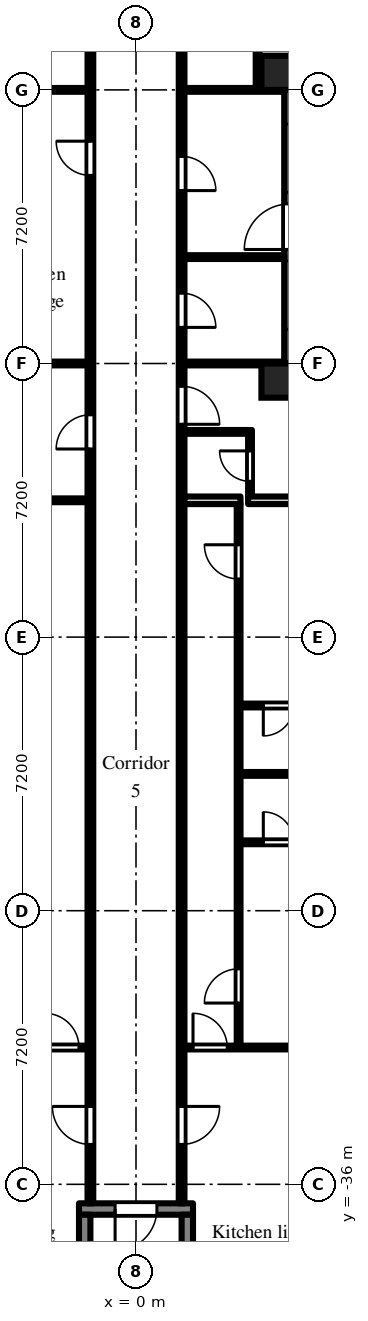
"""IFC4 building model, lengths in metres.
Left out: names, types, materials, properties, quantities, classifications, styles, units other than length and angle.
Written with IfcOpenShell. Run it as: python <this file> out.ifc"""

import sys

from ifc_helpers import new_model, si_unit, direction, frame, frame_2d, origin, origin_2d, place, context, subcontext, project, spatial, rectangle, extrude, element, fill, save


model = new_model("IFC4")
c1 = context("Model", 3, precision=1e-05, world=origin(), true_north=direction((0.0, 1.0)))
c2 = subcontext(c1, "Body", "Model", "MODEL_VIEW")
j1 = project(units=[si_unit("LENGTHUNIT", "METRE"), si_unit("PLANEANGLEUNIT", "RADIAN")], contexts=[c1])
p1 = place(None, origin())
s1 = spatial("IfcSite", under=j1, at=p1, CompositionType="ELEMENT")
p2 = place(p1, origin())
s2 = spatial("IfcBuilding", under=s1, at=p2, CompositionType="ELEMENT")
p3 = place(p2, frame((0.0, 0.0, 84.9)))
s3 = spatial("IfcBuildingStorey", under=s2, at=p3, CompositionType="ELEMENT", Elevation=84.9)
for number, where, z_axis, x_axis in (
    (1, (3.75, -14.85, 0.0), (0.0, 0.0, 1.0), (1.0, 0.0, 0.0)),
    (2, (3.75, -6.75, 0.0), (0.0, 0.0, 1.0), (1.0, 0.0, 0.0)),
):
    element("IfcColumn", number, at=place(p3, frame(where, z_axis=z_axis, x_axis=x_axis)), inside=s3, PredefinedType="COLUMN", context=c2, shape_type="SweptSolid", body=[
        extrude(rectangle(XDim=0.9, YDim=0.9, at=origin_2d()), origin(), (0.0, 0.0, 1.0), 3.0),
    ])
p4 = place(p3, frame((4.05, -14.4, 0.0), z_axis=(0.0, 0.0, 1.0), x_axis=(0.0, 1.0, 0.0)))
e3 = element("IfcWall", 3, at=p4, inside=s3, PredefinedType="SOLIDWALL", context=c2, shape_type="SweptSolid", body=[
    extrude(rectangle(XDim=7.2, YDim=0.3, at=frame_2d((3.6, 0.0))), origin(), (0.0, 0.0, 1.0), 2.1),
])
p5 = place(p4, frame((3.0, 0.0, 0.0)))
e4 = element("IfcOpeningElement", 4, at=p5, cuts=e3, PredefinedType="OPENING", context=c2, shape_type="SweptSolid", body=[
    extrude(rectangle(XDim=1.2, YDim=2.05, at=frame_2d((0.6, 1.025))), frame((0.0, 0.16, 0.0), z_axis=(0.0, -1.0, 0.0), x_axis=(1.0, 0.0, 0.0)), (0.0, 0.0, 1.0), 0.32),
])
p6 = place(p4, frame((0.9, 0.0, 0.2)))
e5 = element("IfcOpeningElement", 5, at=p6, cuts=e3, PredefinedType="OPENING", context=c2, shape_type="SweptSolid", body=[
    extrude(rectangle(XDim=1.8, YDim=1.85, at=frame_2d((0.9, 0.925))), frame((0.0, 0.16, 0.0), z_axis=(0.0, -1.0, 0.0), x_axis=(1.0, 0.0, 0.0)), (0.0, 0.0, 1.0), 0.32),
])
p7 = place(p4, frame((4.5, 0.0, 0.2)))
e6 = element("IfcOpeningElement", 6, at=p7, cuts=e3, PredefinedType="OPENING", context=c2, shape_type="SweptSolid", body=[
    extrude(rectangle(XDim=1.8, YDim=1.85, at=frame_2d((0.9, 0.925))), frame((0.0, 0.16, 0.0), z_axis=(0.0, -1.0, 0.0), x_axis=(1.0, 0.0, 0.0)), (0.0, 0.0, 1.0), 0.32),
])
p8 = place(p3, frame((-1.5, -36.65, 0.0), z_axis=(0.0, 0.0, 1.0), x_axis=(1.0, 0.0, 0.0)))
e7 = element("IfcWall", 7, at=p8, inside=s3, PredefinedType="SHEAR", context=c2, shape_type="SweptSolid", body=[
    extrude(rectangle(XDim=3.0, YDim=0.3, at=frame_2d((1.5, 0.0))), origin(), (0.0, 0.0, 1.0), 2.575),
])
p9 = place(p8, frame((0.95, 0.0, 0.0)))
e8 = element("IfcOpeningElement", 8, at=p9, cuts=e7, PredefinedType="OPENING", context=c2, shape_type="SweptSolid", body=[
    extrude(rectangle(XDim=1.1, YDim=2.1, at=frame_2d((0.55, 1.05))), frame((0.0, 0.16, 0.0), z_axis=(0.0, -1.0, 0.0), x_axis=(1.0, 0.0, 0.0)), (0.0, 0.0, 1.0), 0.32),
])
for number, where, z_axis, x_axis in (
    (9, (-1.35, -36.8, 0.0), (0.0, 0.0, 1.0), (0.0, -1.0, 0.0)),
    (10, (1.35, -36.8, 0.0), (0.0, 0.0, 1.0), (0.0, -1.0, 0.0)),
):
    element("IfcWall", number, at=place(p3, frame(where, z_axis=z_axis, x_axis=x_axis)), inside=s3, PredefinedType="SHEAR", context=c2, shape_type="SweptSolid", body=[
        extrude(rectangle(XDim=5.8, YDim=0.3, at=frame_2d((2.9, 0.0))), origin(), (0.0, 0.0, 1.0), 2.575),
    ])
p10 = place(p3, frame((-6.9, -32.4, 0.0), z_axis=(0.0, 0.0, 1.0), x_axis=(1.0, 0.0, 0.0)))
e11 = element("IfcWall", 11, at=p10, inside=s3, PredefinedType="PARTITIONING", context=c2, shape_type="SweptSolid", body=[
    extrude(rectangle(XDim=5.625, YDim=0.1, at=frame_2d((2.812, 0.0))), origin(), (0.0, 0.0, 1.0), 2.575),
])
p11 = place(p10, frame((4.5, 0.0, 0.0)))
e12 = element("IfcOpeningElement", 12, at=p11, cuts=e11, PredefinedType="OPENING", context=c2, shape_type="SweptSolid", body=[
    extrude(rectangle(XDim=0.9, YDim=2.1, at=frame_2d((0.45, 1.05))), frame((0.0, 0.06, 0.0), z_axis=(0.0, -1.0, 0.0), x_axis=(1.0, 0.0, 0.0)), (0.0, 0.0, 1.0), 0.12),
])
p12 = place(p3, frame((-6.9, -18.0, 0.0), z_axis=(0.0, 0.0, 1.0), x_axis=(1.0, 0.0, 0.0)))
e13 = element("IfcWall", 13, at=p12, inside=s3, PredefinedType="PARTITIONING", context=c2, shape_type="SweptSolid", body=[
    extrude(rectangle(XDim=5.625, YDim=0.1, at=frame_2d((2.812, 0.0))), origin(), (0.0, 0.0, 1.0), 2.575),
])
for number, where, z_axis, x_axis in (
    (14, (-3.9, -14.4, 0.0), (0.0, 0.0, 1.0), (1.0, 0.0, 0.0)),
    (15, (-3.9, -7.2, 0.0), (0.0, 0.0, 1.0), (1.0, 0.0, 0.0)),
):
    element("IfcWall", number, at=place(p3, frame(where, z_axis=z_axis, x_axis=x_axis)), inside=s3, PredefinedType="PARTITIONING", context=c2, shape_type="SweptSolid", body=[
        extrude(rectangle(XDim=2.625, YDim=0.1, at=frame_2d((1.312, 0.0))), origin(), (0.0, 0.0, 1.0), 2.575),
    ])
p13 = place(p3, frame((-1.2, -36.5, 0.0), z_axis=(0.0, 0.0, 1.0), x_axis=(0.0, 1.0, 0.0)))
e16 = element("IfcWall", 16, at=p13, inside=s3, PredefinedType="PARTITIONING", context=c2, shape_type="SweptSolid", body=[
    extrude(rectangle(XDim=35.225, YDim=0.15, at=frame_2d((17.613, 0.0))), origin(), (0.0, 0.0, 1.0), 2.575),
])
p14 = place(p13, frame((30.75, 0.0, 0.0)))
e17 = element("IfcOpeningElement", 17, at=p14, cuts=e16, PredefinedType="OPENING", context=c2, shape_type="SweptSolid", body=[
    extrude(rectangle(XDim=0.9, YDim=2.1, at=frame_2d((0.45, 1.05))), frame((0.0, 0.085, 0.0), z_axis=(0.0, -1.0, 0.0), x_axis=(1.0, 0.0, 0.0)), (0.0, 0.0, 1.0), 0.17),
])
p15 = place(p13, frame((27.05, 0.0, 0.0)))
e18 = element("IfcOpeningElement", 18, at=p15, cuts=e16, PredefinedType="OPENING", context=c2, shape_type="SweptSolid", body=[
    extrude(rectangle(XDim=0.9, YDim=2.1, at=frame_2d((0.45, 1.05))), frame((0.0, 0.085, 0.0), z_axis=(0.0, -1.0, 0.0), x_axis=(1.0, 0.0, 0.0)), (0.0, 0.0, 1.0), 0.17),
])
p16 = place(p13, frame((19.85, 0.0, 0.0)))
e19 = element("IfcOpeningElement", 19, at=p16, cuts=e16, PredefinedType="OPENING", context=c2, shape_type="SweptSolid", body=[
    extrude(rectangle(XDim=0.9, YDim=2.1, at=frame_2d((0.45, 1.05))), frame((0.0, 0.085, 0.0), z_axis=(0.0, -1.0, 0.0), x_axis=(1.0, 0.0, 0.0)), (0.0, 0.0, 1.0), 0.17),
])
p17 = place(p13, frame((1.55, 0.0, 0.0)))
e20 = element("IfcOpeningElement", 20, at=p17, cuts=e16, PredefinedType="OPENING", context=c2, shape_type="SweptSolid", body=[
    extrude(rectangle(XDim=1.0, YDim=2.1, at=frame_2d((0.5, 1.05))), frame((0.0, 0.085, 0.0), z_axis=(0.0, -1.0, 0.0), x_axis=(1.0, 0.0, 0.0)), (0.0, 0.0, 1.0), 0.17),
])
p18 = place(p3, frame((1.2, -36.5, 0.0), z_axis=(0.0, 0.0, 1.0), x_axis=(0.0, 1.0, 0.0)))
e21 = element("IfcWall", 21, at=p18, inside=s3, PredefinedType="PARTITIONING", context=c2, shape_type="SweptSolid", body=[
    extrude(rectangle(XDim=35.375, YDim=0.15, at=frame_2d((17.688, 0.0))), origin(), (0.0, 0.0, 1.0), 2.575),
])
p19 = place(p18, frame((31.85, 0.0, 0.0)))
e22 = element("IfcOpeningElement", 22, at=p19, cuts=e21, PredefinedType="OPENING", context=c2, shape_type="SweptSolid", body=[
    extrude(rectangle(XDim=0.9, YDim=2.1, at=frame_2d((0.45, 1.05))), frame((0.0, 0.085, 0.0), z_axis=(0.0, -1.0, 0.0), x_axis=(1.0, 0.0, 0.0)), (0.0, 0.0, 1.0), 0.17),
])
p20 = place(p18, frame((23.05, 0.0, 0.0)))
e23 = element("IfcOpeningElement", 23, at=p20, cuts=e21, PredefinedType="OPENING", context=c2, shape_type="SweptSolid", body=[
    extrude(rectangle(XDim=0.9, YDim=2.1, at=frame_2d((0.45, 1.05))), frame((0.0, 0.085, 0.0), z_axis=(0.0, -1.0, 0.0), x_axis=(1.0, 0.0, 0.0)), (0.0, 0.0, 1.0), 0.17),
])
p21 = place(p18, frame((26.65, 0.0, 0.0)))
e24 = element("IfcOpeningElement", 24, at=p21, cuts=e21, PredefinedType="OPENING", context=c2, shape_type="SweptSolid", body=[
    extrude(rectangle(XDim=0.9, YDim=2.1, at=frame_2d((0.45, 1.05))), frame((0.0, 0.085, 0.0), z_axis=(0.0, -1.0, 0.0), x_axis=(1.0, 0.0, 0.0)), (0.0, 0.0, 1.0), 0.17),
])
p22 = place(p18, frame((20.5, 0.0, 0.0)))
e25 = element("IfcOpeningElement", 25, at=p22, cuts=e21, PredefinedType="OPENING", context=c2, shape_type="SweptSolid", body=[
    extrude(rectangle(XDim=1.0, YDim=2.1, at=frame_2d((0.5, 1.05))), frame((0.0, 0.085, 0.0), z_axis=(0.0, -1.0, 0.0), x_axis=(1.0, 0.0, 0.0)), (0.0, 0.0, 1.0), 0.17),
])
p23 = place(p18, frame((1.55, 0.0, 0.0)))
e26 = element("IfcOpeningElement", 26, at=p23, cuts=e21, PredefinedType="OPENING", context=c2, shape_type="SweptSolid", body=[
    extrude(rectangle(XDim=1.0, YDim=2.1, at=frame_2d((0.5, 1.05))), frame((0.0, 0.085, 0.0), z_axis=(0.0, -1.0, 0.0), x_axis=(1.0, 0.0, 0.0)), (0.0, 0.0, 1.0), 0.17),
])
p24 = place(p3, frame((1.275, -32.4, 0.0), z_axis=(0.0, 0.0, 1.0), x_axis=(1.0, 0.0, 0.0)))
e27 = element("IfcWall", 27, at=p24, inside=s3, PredefinedType="PARTITIONING", context=c2, shape_type="SweptSolid", body=[
    extrude(rectangle(XDim=5.625, YDim=0.1, at=frame_2d((2.812, 0.0))), origin(), (0.0, 0.0, 1.0), 2.575),
])
p25 = place(p24, frame((0.225, 0.0, 0.0)))
e28 = element("IfcOpeningElement", 28, at=p25, cuts=e27, PredefinedType="OPENING", context=c2, shape_type="SweptSolid", body=[
    extrude(rectangle(XDim=0.9, YDim=2.1, at=frame_2d((0.45, 1.05))), frame((0.0, 0.06, 0.0), z_axis=(0.0, -1.0, 0.0), x_axis=(1.0, 0.0, 0.0)), (0.0, 0.0, 1.0), 0.12),
])
p26 = place(p3, frame((1.275, -18.0, 0.0), z_axis=(0.0, 0.0, 1.0), x_axis=(1.0, 0.0, 0.0)))
e29 = element("IfcWall", 29, at=p26, inside=s3, PredefinedType="PARTITIONING", context=c2, shape_type="SweptSolid", body=[
    extrude(rectangle(XDim=1.475, YDim=0.2, at=frame_2d((0.738, 0.0))), origin(), (0.0, 0.0, 1.0), 2.575),
])
p27 = place(p3, frame((1.275, -16.2, 0.0), z_axis=(0.0, 0.0, 1.0), x_axis=(1.0, 0.0, 0.0)))
e30 = element("IfcWall", 30, at=p27, inside=s3, PredefinedType="PARTITIONING", context=c2, shape_type="SweptSolid", body=[
    extrude(rectangle(XDim=1.775, YDim=0.1, at=frame_2d((0.888, 0.0))), origin(), (0.0, 0.0, 1.0), 2.575),
])
for number, where, z_axis, x_axis in (
    (31, (1.275, -14.4, 0.0), (0.0, 0.0, 1.0), (1.0, 0.0, 0.0)),
    (32, (1.275, -11.6, 0.0), (0.0, 0.0, 1.0), (1.0, 0.0, 0.0)),
    (33, (1.275, -7.2, 0.0), (0.0, 0.0, 1.0), (1.0, 0.0, 0.0)),
):
    element("IfcWall", number, at=place(p3, frame(where, z_axis=z_axis, x_axis=x_axis)), inside=s3, PredefinedType="PARTITIONING", context=c2, shape_type="SweptSolid", body=[
        extrude(rectangle(XDim=2.625, YDim=0.1, at=frame_2d((1.312, 0.0))), origin(), (0.0, 0.0, 1.0), 2.575),
    ])
p28 = place(p3, frame((2.7, -32.35, 0.0), z_axis=(0.0, 0.0, 1.0), x_axis=(0.0, 1.0, 0.0)))
e34 = element("IfcWall", 34, at=p28, inside=s3, PredefinedType="PARTITIONING", context=c2, shape_type="SweptSolid", body=[
    extrude(rectangle(XDim=14.25, YDim=0.1, at=frame_2d((7.125, 0.0))), origin(), (0.0, 0.0, 1.0), 2.575),
])
p29 = place(p28, frame((1.12, 0.0, 0.0)))
e35 = element("IfcOpeningElement", 35, at=p29, cuts=e34, PredefinedType="OPENING", context=c2, shape_type="SweptSolid", body=[
    extrude(rectangle(XDim=0.9, YDim=2.1, at=frame_2d((0.45, 1.05))), frame((0.0, 0.06, 0.0), z_axis=(0.0, -1.0, 0.0), x_axis=(1.0, 0.0, 0.0)), (0.0, 0.0, 1.0), 0.12),
])
p30 = place(p28, frame((12.28, 0.0, 0.0)))
e36 = element("IfcOpeningElement", 36, at=p30, cuts=e34, PredefinedType="OPENING", context=c2, shape_type="SweptSolid", body=[
    extrude(rectangle(XDim=0.9, YDim=2.1, at=frame_2d((0.45, 1.05))), frame((0.0, 0.06, 0.0), z_axis=(0.0, -1.0, 0.0), x_axis=(1.0, 0.0, 0.0)), (0.0, 0.0, 1.0), 0.12),
])
p31 = place(p3, frame((2.75, -27.0, 0.0), z_axis=(0.0, 0.0, 1.0), x_axis=(1.0, 0.0, 0.0)))
e37 = element("IfcWall", 37, at=p31, inside=s3, PredefinedType="PARTITIONING", context=c2, shape_type="SweptSolid", body=[
    extrude(rectangle(XDim=2.1, YDim=0.1, at=frame_2d((1.05, 0.0))), origin(), (0.0, 0.0, 1.0), 2.575),
])
p32 = place(p31, frame((0.6, 0.0, 0.0)))
e38 = element("IfcOpeningElement", 38, at=p32, cuts=e37, PredefinedType="OPENING", context=c2, shape_type="SweptSolid", body=[
    extrude(rectangle(XDim=0.8, YDim=2.1, at=frame_2d((0.4, 1.05))), frame((0.0, 0.06, 0.0), z_axis=(0.0, -1.0, 0.0), x_axis=(1.0, 0.0, 0.0)), (0.0, 0.0, 1.0), 0.12),
])
p33 = place(p3, frame((2.75, -25.2, 0.0), z_axis=(0.0, 0.0, 1.0), x_axis=(1.0, 0.0, 0.0)))
e39 = element("IfcWall", 39, at=p33, inside=s3, PredefinedType="PARTITIONING", context=c2, shape_type="SweptSolid", body=[
    extrude(rectangle(XDim=4.15, YDim=0.1, at=frame_2d((2.075, 0.0))), origin(), (0.0, 0.0, 1.0), 2.575),
])
p34 = place(p3, frame((2.75, -23.4, 0.0), z_axis=(0.0, 0.0, 1.0), x_axis=(1.0, 0.0, 0.0)))
e40 = element("IfcWall", 40, at=p34, inside=s3, PredefinedType="PARTITIONING", context=c2, shape_type="SweptSolid", body=[
    extrude(rectangle(XDim=2.1, YDim=0.1, at=frame_2d((1.05, 0.0))), origin(), (0.0, 0.0, 1.0), 2.575),
])
p35 = place(p34, frame((0.6, 0.0, 0.0)))
e41 = element("IfcOpeningElement", 41, at=p35, cuts=e40, PredefinedType="OPENING", context=c2, shape_type="SweptSolid", body=[
    extrude(rectangle(XDim=0.8, YDim=2.1, at=frame_2d((0.4, 1.05))), frame((0.0, 0.06, 0.0), z_axis=(0.0, -1.0, 0.0), x_axis=(1.0, 0.0, 0.0)), (0.0, 0.0, 1.0), 0.12),
])
p36 = place(p3, frame((3.0, -17.9, 0.0), z_axis=(0.0, 0.0, 1.0), x_axis=(0.0, 1.0, 0.0)))
e42 = element("IfcWall", 42, at=p36, inside=s3, PredefinedType="PARTITIONING", context=c2, shape_type="SweptSolid", body=[
    extrude(rectangle(XDim=1.65, YDim=0.1, at=frame_2d((0.825, 0.0))), origin(), (0.0, 0.0, 1.0), 2.575),
])
p37 = place(p36, frame((0.4, 0.0, 0.0)))
e43 = element("IfcOpeningElement", 43, at=p37, cuts=e42, PredefinedType="OPENING", context=c2, shape_type="SweptSolid", body=[
    extrude(rectangle(XDim=0.8, YDim=2.1, at=frame_2d((0.4, 1.05))), frame((0.0, 0.06, 0.0), z_axis=(0.0, -1.0, 0.0), x_axis=(1.0, 0.0, 0.0)), (0.0, 0.0, 1.0), 0.12),
])
p38 = place(p3, frame((2.95, -18.0, 0.0), z_axis=(0.0, 0.0, 1.0), x_axis=(1.0, 0.0, 0.0)))
e44 = element("IfcWall", 44, at=p38, inside=s3, PredefinedType="PARTITIONING", context=c2, shape_type="SweptSolid", body=[
    extrude(rectangle(XDim=3.95, YDim=0.2, at=frame_2d((1.975, 0.0))), origin(), (0.0, 0.0, 1.0), 2.575),
])
p39 = place(p3, frame((3.2, -7.15, 0.0), z_axis=(0.0, 0.0, 1.0), x_axis=(0.0, 1.0, 0.0)))
e45 = element("IfcWall", 45, at=p39, inside=s3, PredefinedType="PARTITIONING", context=c2, shape_type="SweptSolid", body=[
    extrude(rectangle(XDim=5.875, YDim=0.1, at=frame_2d((2.938, 0.0))), origin(), (0.0, 0.0, 1.0), 2.575),
])
p40 = place(p9, frame((1.1, 0.0, 0.0), z_axis=(0.0, 0.0, 1.0), x_axis=(-1.0, 0.0, 0.0)))
e46 = element("IfcDoor", 46, at=p40, inside=s3, OperationType="SINGLE_SWING_RIGHT", PredefinedType="DOOR", context=c2, shape_type="SweptSolid", body=[
    extrude(rectangle(XDim=1.1, YDim=2.1, at=frame_2d((0.55, 1.05))), frame((0.0, 0.025, 0.0), z_axis=(0.0, -1.0, 0.0), x_axis=(1.0, 0.0, 0.0)), (0.0, 0.0, 1.0), 0.05),
])
fill(e8, e46)
p41 = place(p20, frame((0.9, 0.0, 0.0), z_axis=(0.0, 0.0, 1.0), x_axis=(-1.0, 0.0, 0.0)))
e47 = element("IfcDoor", 47, at=p41, inside=s3, OperationType="SINGLE_SWING_RIGHT", PredefinedType="DOOR", context=c2, shape_type="SweptSolid", body=[
    extrude(rectangle(XDim=0.9, YDim=2.1, at=frame_2d((0.45, 1.05))), frame((0.0, 0.025, 0.0), z_axis=(0.0, -1.0, 0.0), x_axis=(1.0, 0.0, 0.0)), (0.0, 0.0, 1.0), 0.05),
])
fill(e23, e47)
p42 = place(p21, frame((0.9, 0.0, 0.0), z_axis=(0.0, 0.0, 1.0), x_axis=(-1.0, 0.0, 0.0)))
e48 = element("IfcDoor", 48, at=p42, inside=s3, OperationType="SINGLE_SWING_RIGHT", PredefinedType="DOOR", context=c2, shape_type="SweptSolid", body=[
    extrude(rectangle(XDim=0.9, YDim=2.1, at=frame_2d((0.45, 1.05))), frame((0.0, 0.025, 0.0), z_axis=(0.0, -1.0, 0.0), x_axis=(1.0, 0.0, 0.0)), (0.0, 0.0, 1.0), 0.05),
])
fill(e24, e48)
p43 = place(p37, origin())
e49 = element("IfcDoor", 49, at=p43, inside=s3, OperationType="SINGLE_SWING_RIGHT", PredefinedType="DOOR", context=c2, shape_type="SweptSolid", body=[
    extrude(rectangle(XDim=0.8, YDim=2.1, at=frame_2d((0.4, 1.05))), frame((0.0, 0.025, 0.0), z_axis=(0.0, -1.0, 0.0), x_axis=(1.0, 0.0, 0.0)), (0.0, 0.0, 1.0), 0.05),
])
fill(e43, e49)
p44 = place(p22, frame((1.0, 0.0, 0.0), z_axis=(0.0, 0.0, 1.0), x_axis=(-1.0, 0.0, 0.0)))
e50 = element("IfcDoor", 50, at=p44, inside=s3, OperationType="SINGLE_SWING_RIGHT", PredefinedType="DOOR", context=c2, shape_type="SweptSolid", body=[
    extrude(rectangle(XDim=1.0, YDim=2.1, at=frame_2d((0.5, 1.05))), frame((0.0, 0.025, 0.0), z_axis=(0.0, -1.0, 0.0), x_axis=(1.0, 0.0, 0.0)), (0.0, 0.0, 1.0), 0.05),
])
fill(e25, e50)
p45 = place(p23, frame((1.0, 0.0, 0.0), z_axis=(0.0, 0.0, 1.0), x_axis=(-1.0, 0.0, 0.0)))
e51 = element("IfcDoor", 51, at=p45, inside=s3, OperationType="SINGLE_SWING_LEFT", PredefinedType="DOOR", context=c2, shape_type="SweptSolid", body=[
    extrude(rectangle(XDim=1.0, YDim=2.1, at=frame_2d((0.5, 1.05))), frame((0.0, 0.025, 0.0), z_axis=(0.0, -1.0, 0.0), x_axis=(1.0, 0.0, 0.0)), (0.0, 0.0, 1.0), 0.05),
])
fill(e26, e51)
p46 = place(p25, origin())
e52 = element("IfcDoor", 52, at=p46, inside=s3, OperationType="SINGLE_SWING_LEFT", PredefinedType="DOOR", context=c2, shape_type="SweptSolid", body=[
    extrude(rectangle(XDim=0.9, YDim=2.1, at=frame_2d((0.45, 1.05))), frame((0.0, 0.025, 0.0), z_axis=(0.0, -1.0, 0.0), x_axis=(1.0, 0.0, 0.0)), (0.0, 0.0, 1.0), 0.05),
])
fill(e28, e52)
p47 = place(p29, origin())
e53 = element("IfcDoor", 53, at=p47, inside=s3, OperationType="SINGLE_SWING_LEFT", PredefinedType="DOOR", context=c2, shape_type="SweptSolid", body=[
    extrude(rectangle(XDim=0.9, YDim=2.1, at=frame_2d((0.45, 1.05))), frame((0.0, 0.025, 0.0), z_axis=(0.0, -1.0, 0.0), x_axis=(1.0, 0.0, 0.0)), (0.0, 0.0, 1.0), 0.05),
])
fill(e35, e53)
p48 = place(p30, origin())
e54 = element("IfcDoor", 54, at=p48, inside=s3, OperationType="SINGLE_SWING_RIGHT", PredefinedType="DOOR", context=c2, shape_type="SweptSolid", body=[
    extrude(rectangle(XDim=0.9, YDim=2.1, at=frame_2d((0.45, 1.05))), frame((0.0, 0.025, 0.0), z_axis=(0.0, -1.0, 0.0), x_axis=(1.0, 0.0, 0.0)), (0.0, 0.0, 1.0), 0.05),
])
fill(e36, e54)
p49 = place(p35, frame((0.8, 0.0, 0.0), z_axis=(0.0, 0.0, 1.0), x_axis=(-1.0, 0.0, 0.0)))
e55 = element("IfcDoor", 55, at=p49, inside=s3, OperationType="SINGLE_SWING_RIGHT", PredefinedType="DOOR", context=c2, shape_type="SweptSolid", body=[
    extrude(rectangle(XDim=0.8, YDim=2.1, at=frame_2d((0.4, 1.05))), frame((0.0, 0.025, 0.0), z_axis=(0.0, -1.0, 0.0), x_axis=(1.0, 0.0, 0.0)), (0.0, 0.0, 1.0), 0.05),
])
fill(e41, e55)
p50 = place(p32, origin())
e56 = element("IfcDoor", 56, at=p50, inside=s3, OperationType="SINGLE_SWING_LEFT", PredefinedType="DOOR", context=c2, shape_type="SweptSolid", body=[
    extrude(rectangle(XDim=0.8, YDim=2.1, at=frame_2d((0.4, 1.05))), frame((0.0, 0.025, 0.0), z_axis=(0.0, -1.0, 0.0), x_axis=(1.0, 0.0, 0.0)), (0.0, 0.0, 1.0), 0.05),
])
fill(e38, e56)
p51 = place(p15, origin())
e57 = element("IfcDoor", 57, at=p51, inside=s3, OperationType="SINGLE_SWING_RIGHT", PredefinedType="DOOR", context=c2, shape_type="SweptSolid", body=[
    extrude(rectangle(XDim=0.9, YDim=2.1, at=frame_2d((0.45, 1.05))), frame((0.0, 0.025, 0.0), z_axis=(0.0, -1.0, 0.0), x_axis=(1.0, 0.0, 0.0)), (0.0, 0.0, 1.0), 0.05),
])
fill(e18, e57)
p52 = place(p16, origin())
e58 = element("IfcDoor", 58, at=p52, inside=s3, OperationType="SINGLE_SWING_LEFT", PredefinedType="DOOR", context=c2, shape_type="SweptSolid", body=[
    extrude(rectangle(XDim=0.9, YDim=2.1, at=frame_2d((0.45, 1.05))), frame((0.0, 0.025, 0.0), z_axis=(0.0, -1.0, 0.0), x_axis=(1.0, 0.0, 0.0)), (0.0, 0.0, 1.0), 0.05),
])
fill(e19, e58)
p53 = place(p17, origin())
e59 = element("IfcDoor", 59, at=p53, inside=s3, OperationType="SINGLE_SWING_RIGHT", PredefinedType="DOOR", context=c2, shape_type="SweptSolid", body=[
    extrude(rectangle(XDim=1.0, YDim=2.1, at=frame_2d((0.5, 1.05))), frame((0.0, 0.025, 0.0), z_axis=(0.0, -1.0, 0.0), x_axis=(1.0, 0.0, 0.0)), (0.0, 0.0, 1.0), 0.05),
])
fill(e20, e59)
p54 = place(p11, origin())
e60 = element("IfcDoor", 60, at=p54, inside=s3, OperationType="SINGLE_SWING_LEFT", PredefinedType="DOOR", context=c2, shape_type="SweptSolid", body=[
    extrude(rectangle(XDim=0.9, YDim=2.1, at=frame_2d((0.45, 1.05))), frame((0.0, 0.025, 0.0), z_axis=(0.0, -1.0, 0.0), x_axis=(1.0, 0.0, 0.0)), (0.0, 0.0, 1.0), 0.05),
])
fill(e12, e60)
save(model, sys.argv[1])
